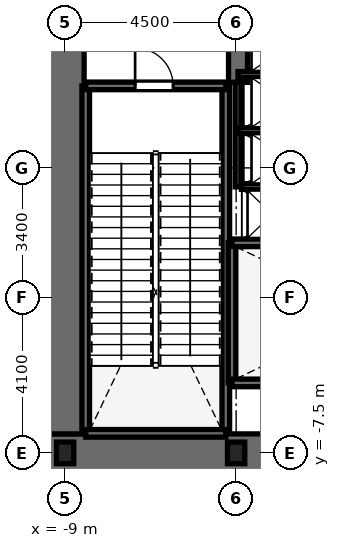
"""IFC4 building model, lengths in metres.
Left out: names, types, materials, properties, quantities, classifications, styles, units other than length and angle.
Written with IfcOpenShell. Run it as: python <this file> out.ifc"""

import sys

from ifc_helpers import new_model, si_unit, direction, frame, frame_2d, origin, origin_2d, place, context, subcontext, project, spatial, rectangle, i_section, extrude, element, fill, save


model = new_model("IFC4")
c1 = context("Model", 3, precision=1e-05, world=origin(), true_north=direction((0.0, 1.0)))
c2 = subcontext(c1, "Body", "Model", "MODEL_VIEW")
j1 = project(units=[si_unit("LENGTHUNIT", "METRE"), si_unit("PLANEANGLEUNIT", "RADIAN")], contexts=[c1])
p1 = place(None, origin())
s1 = spatial("IfcSite", under=j1, at=p1, CompositionType="ELEMENT")
p2 = place(p1, origin())
s2 = spatial("IfcBuilding", under=s1, at=p2, CompositionType="ELEMENT")
p3 = place(p2, frame((0.0, 0.0, 11.4)))
s3 = spatial("IfcBuildingStorey", under=s2, at=p3, CompositionType="ELEMENT", Elevation=11.4)
p4 = place(p3, frame((-9.5, -7.5, 0.0), z_axis=(0.0, 0.0, 1.0), x_axis=(1.0, 0.0, 0.0)))
e1 = element("IfcWall", 1, at=p4, inside=s3, PredefinedType="SHEAR", context=c2, shape_type="SweptSolid", body=[
    extrude(rectangle(XDim=19.0, YDim=1.0, at=frame_2d((9.5, 0.0))), origin(), (0.0, 0.0, 1.0), 7.2),
])
p5 = place(p4, frame((9.55, 0.0, 0.0)))
e2 = element("IfcOpeningElement", 2, at=p5, cuts=e1, PredefinedType="OPENING", context=c2, shape_type="SweptSolid", body=[
    extrude(rectangle(XDim=1.0, YDim=2.15, at=frame_2d((0.5, 1.075))), frame((0.0, 0.51, 0.0), z_axis=(0.0, -1.0, 0.0), x_axis=(1.0, 0.0, 0.0)), (0.0, 0.0, 1.0), 1.02),
])
p6 = place(p3, frame((-9.0, -7.0, 0.0), z_axis=(0.0, 0.0, 1.0), x_axis=(0.0, 1.0, 0.0)))
e3 = element("IfcWall", 3, at=p6, inside=s3, PredefinedType="SHEAR", context=c2, shape_type="SweptSolid", body=[
    extrude(rectangle(XDim=14.0, YDim=1.0, at=frame_2d((7.0, 0.0))), origin(), (0.0, 0.0, 1.0), 7.2),
])
p7 = place(p6, frame((10.125, 0.0, 0.0)))
e4 = element("IfcOpeningElement", 4, at=p7, cuts=e3, PredefinedType="OPENING", context=c2, shape_type="SweptSolid", body=[
    extrude(rectangle(XDim=1.05, YDim=2.15, at=frame_2d((0.525, 1.075))), frame((0.0, 0.51, 0.0), z_axis=(0.0, -1.0, 0.0), x_axis=(1.0, 0.0, 0.0)), (0.0, 0.0, 1.0), 1.02),
])
p8 = place(p3, frame((-4.45, 2.25, 0.0), z_axis=(0.0, 0.0, 1.0), x_axis=(0.0, 1.0, 0.0)))
e5 = element("IfcWall", 5, at=p8, inside=s3, PredefinedType="SHEAR", context=c2, shape_type="SweptSolid", body=[
    extrude(rectangle(XDim=4.75, YDim=0.5, at=frame_2d((2.375, 0.0))), origin(), (0.0, 0.0, 1.0), 7.2),
])
for number, where, z_axis, x_axis in (
    (6, (-8.458, -6.985, 0.0), (0.0, 0.0, 1.0), (0.0, 1.0, 0.0)),
    (7, (-4.772, -6.985, 0.0), (0.0, 0.0, 1.0), (0.0, 1.0, 0.0)),
):
    element("IfcWall", number, at=place(p3, frame(where, z_axis=z_axis, x_axis=x_axis)), inside=s3, PredefinedType="SHEAR", context=c2, shape_type="SweptSolid", body=[
        extrude(rectangle(XDim=9.143, YDim=0.2, at=frame_2d((4.572, 0.0))), origin(), (0.0, 0.0, 1.0), 7.2),
    ])
p9 = place(p3, frame((-8.458, -6.985, 0.0), z_axis=(0.0, 0.0, 1.0), x_axis=(1.0, 0.0, 0.0)))
e8 = element("IfcWall", 8, at=p9, inside=s3, PredefinedType="SHEAR", context=c2, shape_type="SweptSolid", body=[
    extrude(rectangle(XDim=3.686, YDim=0.2, at=frame_2d((1.843, 0.0))), origin(), (0.0, 0.0, 1.0), 7.2),
])
p10 = place(p3, frame((-8.458, 2.158, 0.0), z_axis=(0.0, 0.0, 1.0), x_axis=(1.0, 0.0, 0.0)))
e9 = element("IfcWall", 9, at=p10, inside=s3, PredefinedType="SHEAR", context=c2, shape_type="SweptSolid", body=[
    extrude(rectangle(XDim=3.686, YDim=0.2, at=frame_2d((1.843, 0.0))), origin(), (0.0, 0.0, 1.0), 7.2),
])
p11 = place(p10, frame((1.3, 0.0, 0.0)))
e10 = element("IfcOpeningElement", 10, at=p11, cuts=e9, PredefinedType="OPENING", context=c2, shape_type="SweptSolid", body=[
    extrude(rectangle(XDim=1.0, YDim=2.15, at=frame_2d((0.5, 1.075))), frame((0.0, 0.11, 0.0), z_axis=(0.0, -1.0, 0.0), x_axis=(1.0, 0.0, 0.0)), (0.0, 0.0, 1.0), 0.22),
])
p12 = place(p3, frame((-4.608, -5.658, 0.0), z_axis=(0.0, 0.0, 1.0), x_axis=(0.0, 1.0, 0.0)))
e11 = element("IfcWall", 11, at=p12, inside=s3, PredefinedType="SHEAR", context=c2, shape_type="SweptSolid", body=[
    extrude(rectangle(XDim=3.686, YDim=0.2, at=frame_2d((1.843, 0.0))), origin(), (0.0, 0.0, 1.0), 7.2),
])
p13 = place(p3, frame((-4.608, -5.658, 0.0), z_axis=(0.0, 0.0, 1.0), x_axis=(1.0, 0.0, 0.0)))
e12 = element("IfcWall", 12, at=p13, inside=s3, PredefinedType="SHEAR", context=c2, shape_type="SweptSolid", body=[
    extrude(rectangle(XDim=9.166, YDim=0.2, at=frame_2d((4.583, 0.0))), origin(), (0.0, 0.0, 1.0), 7.2),
])
p14 = place(p13, frame((7.45, 0.0, 0.0)))
e13 = element("IfcOpeningElement", 13, at=p14, cuts=e12, PredefinedType="OPENING", context=c2, shape_type="SweptSolid", body=[
    extrude(rectangle(XDim=1.0, YDim=2.15, at=frame_2d((0.5, 1.075))), frame((0.0, 0.11, 0.0), z_axis=(0.0, -1.0, 0.0), x_axis=(1.0, 0.0, 0.0)), (0.0, 0.0, 1.0), 0.22),
])
p15 = place(p3, frame((-4.608, -1.972, 0.0), z_axis=(0.0, 0.0, 1.0), x_axis=(1.0, 0.0, 0.0)))
e14 = element("IfcWall", 14, at=p15, inside=s3, PredefinedType="SHEAR", context=c2, shape_type="SweptSolid", body=[
    extrude(rectangle(XDim=9.166, YDim=0.2, at=frame_2d((4.583, 0.0))), origin(), (0.0, 0.0, 1.0), 7.2),
])
for number, where, z_axis, x_axis in (
    (15, (-9.0, -7.5, 0.0), (0.0, 0.0, 1.0), (1.0, 0.0, 0.0)),
    (16, (-4.5, -7.5, 0.0), (0.0, 0.0, 1.0), (1.0, 0.0, 0.0)),
):
    element("IfcColumn", number, at=place(p3, frame(where, z_axis=z_axis, x_axis=x_axis)), inside=s3, PredefinedType="COLUMN", context=c2, shape_type="SweptSolid", body=[
        extrude(i_section(OverallWidth=0.454, OverallDepth=0.569, WebThickness=0.078, FlangeThickness=0.125, at=origin_2d()), origin(), (0.0, 0.0, 1.0), 7.2),
    ])
p16 = place(p3, frame((-4.45, -0.5, 0.0), z_axis=(0.0, 0.0, 1.0), x_axis=(0.0, 1.0, 0.0)))
e17 = element("IfcWall", 17, at=p16, inside=s3, PredefinedType="PARTITIONING", context=c2, shape_type="SweptSolid", body=[
    extrude(rectangle(XDim=2.75, YDim=0.15, at=frame_2d((1.375, 0.0))), origin(), (0.0, 0.0, 1.0), 6.88),
])
for number, where, z_axis, x_axis in (
    (18, (-4.45, 0.98, 0.0), (0.0, 0.0, 1.0), (1.0, 0.0, 0.0)),
    (19, (-4.45, 2.46, 0.0), (0.0, 0.0, 1.0), (1.0, 0.0, 0.0)),
):
    element("IfcWall", number, at=place(p3, frame(where, z_axis=z_axis, x_axis=x_axis)), inside=s3, PredefinedType="PARTITIONING", context=c2, shape_type="SweptSolid", body=[
        extrude(rectangle(XDim=2.55, YDim=0.15, at=frame_2d((1.275, 0.0))), origin(), (0.0, 0.0, 1.0), 6.88),
    ])
p17 = place(p3, frame((-4.36, -0.49, 0.0), z_axis=(0.0, 0.0, 1.0), x_axis=(1.0, 0.0, 0.0)))
e20 = element("IfcWall", 20, at=p17, inside=s3, PredefinedType="PARTITIONING", context=c2, shape_type="SweptSolid", body=[
    extrude(rectangle(XDim=8.72, YDim=0.15, at=frame_2d((4.36, 0.0))), origin(), (0.0, 0.0, 1.0), 6.88),
])
p18 = place(p17, frame((2.81, 0.0, 0.0)))
e21 = element("IfcOpeningElement", 21, at=p18, cuts=e20, PredefinedType="OPENING", context=c2, shape_type="SweptSolid", body=[
    extrude(rectangle(XDim=0.85, YDim=2.03, at=frame_2d((0.425, 1.015))), frame((0.0, 0.085, 0.0), z_axis=(0.0, -1.0, 0.0), x_axis=(1.0, 0.0, 0.0)), (0.0, 0.0, 1.0), 0.17),
])
p19 = place(p17, frame((4.61, 0.0, 0.0)))
e22 = element("IfcOpeningElement", 22, at=p19, cuts=e20, PredefinedType="OPENING", context=c2, shape_type="SweptSolid", body=[
    extrude(rectangle(XDim=0.85, YDim=2.03, at=frame_2d((0.425, 1.015))), frame((0.0, 0.085, 0.0), z_axis=(0.0, -1.0, 0.0), x_axis=(1.0, 0.0, 0.0)), (0.0, 0.0, 1.0), 0.17),
])
p20 = place(p11, origin())
e23 = element("IfcDoor", 23, at=p20, inside=s3, OperationType="SINGLE_SWING_LEFT", PredefinedType="DOOR", context=c2, shape_type="SweptSolid", body=[
    extrude(rectangle(XDim=1.0, YDim=2.15, at=frame_2d((0.5, 1.075))), frame((0.0, 0.025, 0.0), z_axis=(0.0, -1.0, 0.0), x_axis=(1.0, 0.0, 0.0)), (0.0, 0.0, 1.0), 0.05),
])
fill(e10, e23)
save(model, sys.argv[1])
